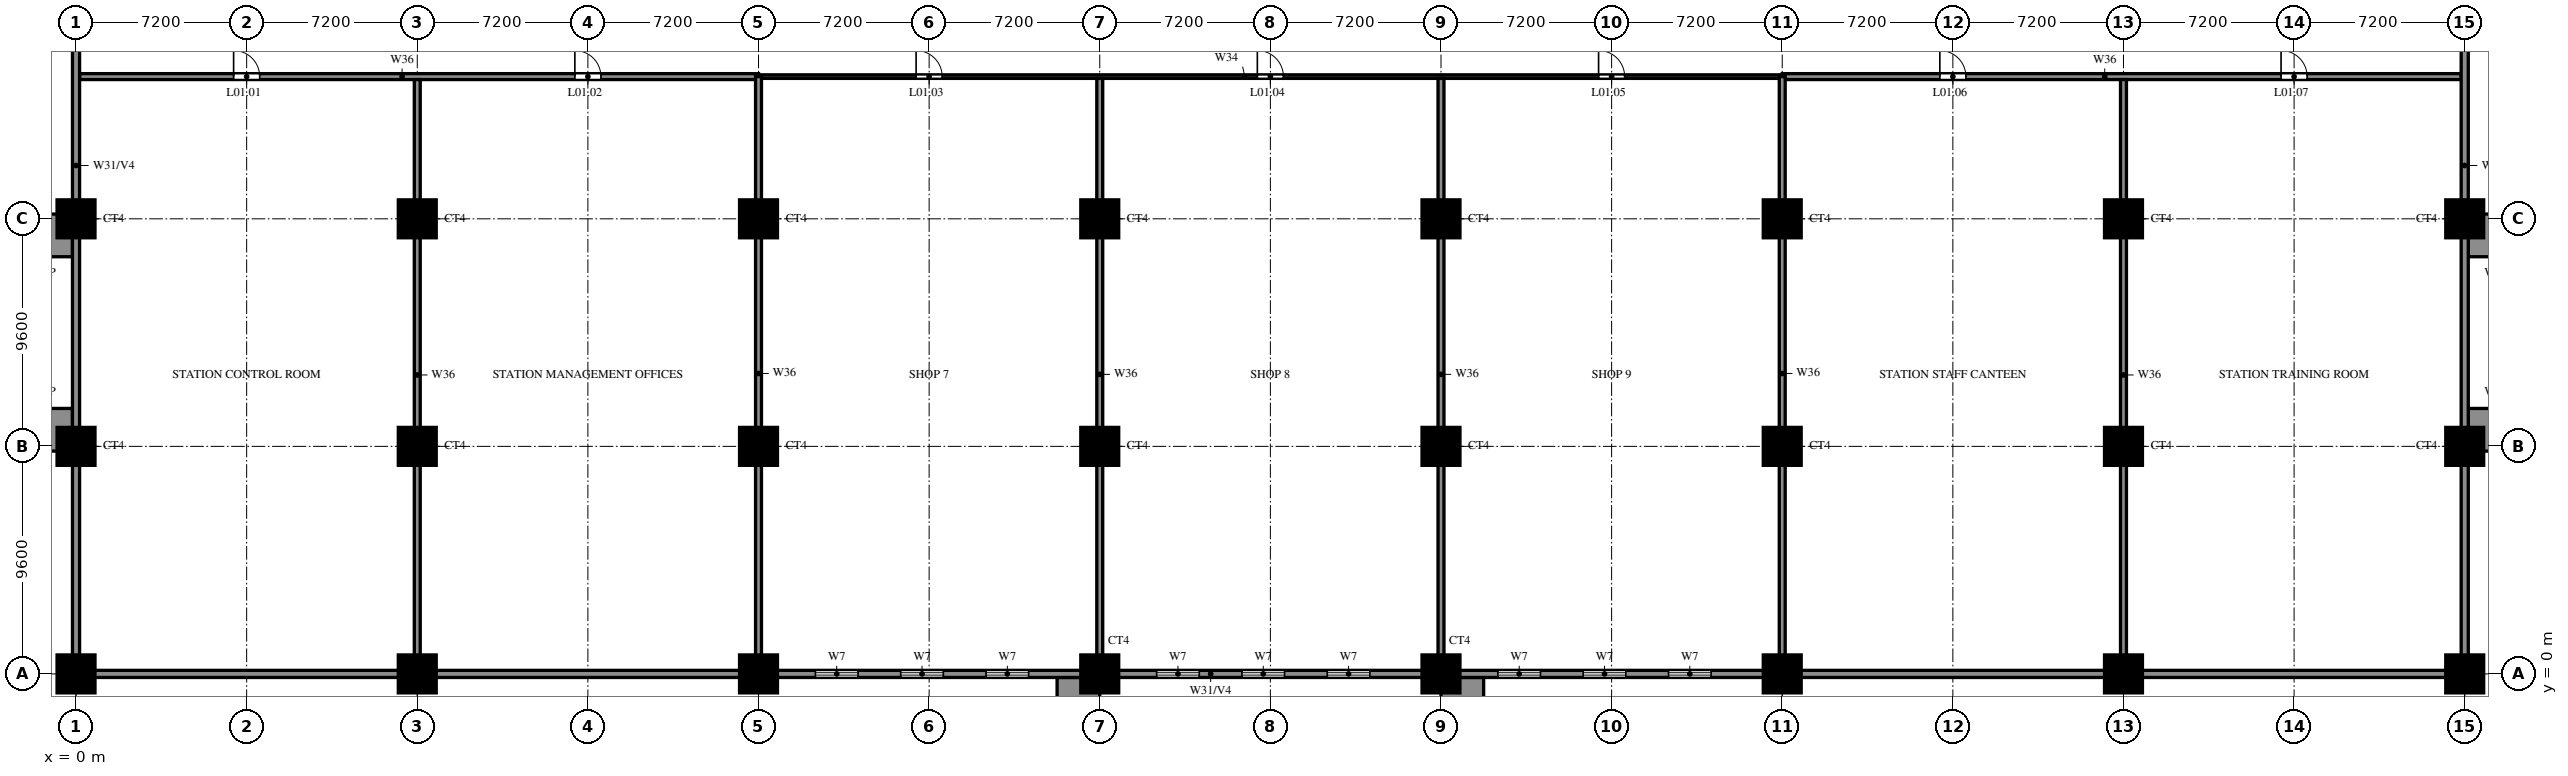
"""IFC4 building model, lengths in metres.
Left out: names, types, materials, properties, quantities, classifications, styles, units other than length and angle.
Written with IfcOpenShell. Run it as: python <this file> out.ifc"""

import sys

from ifc_helpers import new_model, si_unit, direction, frame, frame_2d, origin, origin_with_axes, origin_2d, place, context, subcontext, project, spatial, rectangle, circle, extrude, source, transform, mapped, element, fill, save


model = new_model("IFC4")
c1 = context("Model", 3, precision=1e-05, world=origin(), true_north=direction((0.0, 1.0)))
c2 = subcontext(c1, "Body", "Model", "MODEL_VIEW")
j1 = project(units=[si_unit("LENGTHUNIT", "METRE"), si_unit("PLANEANGLEUNIT", "RADIAN")], contexts=[c1])
p1 = place(None, origin())
s1 = spatial("IfcSite", under=j1, at=p1, CompositionType="ELEMENT")
p2 = place(p1, origin())
s2 = spatial("IfcBuilding", under=s1, at=p2, CompositionType="ELEMENT")
p3 = place(p2, frame((0.0, 0.0, 7.8)))
s3 = spatial("IfcBuildingStorey", under=s2, at=p3, CompositionType="ELEMENT", Elevation=7.8)
m1 = source(origin(), c2, "Body", "SweptSolid", [
    extrude(circle(Radius=0.8, at=origin_2d()), origin(), (0.0, 0.0, 1.0), 5.0),
])
for number, where, z_axis, x_axis in (
    (1, (0.0, 0.0, 0.0), (0.0, 0.0, 1.0), (1.0, 0.0, 0.0)),
    (2, (14.4, 0.0, 0.0), (0.0, 0.0, 1.0), (1.0, 0.0, 0.0)),
    (3, (28.8, 0.0, 0.0), (0.0, 0.0, 1.0), (1.0, 0.0, 0.0)),
    (4, (43.2, 0.0, 0.0), (0.0, 0.0, 1.0), (1.0, 0.0, 0.0)),
    (5, (57.6, 0.0, 0.0), (0.0, 0.0, 1.0), (1.0, 0.0, 0.0)),
    (6, (72.0, 0.0, 0.0), (0.0, 0.0, 1.0), (1.0, 0.0, 0.0)),
    (7, (86.4, 0.0, 0.0), (0.0, 0.0, 1.0), (1.0, 0.0, 0.0)),
    (8, (100.8, 0.0, 0.0), (0.0, 0.0, 1.0), (1.0, 0.0, 0.0)),
    (9, (0.0, 9.6, 0.0), (0.0, 0.0, 1.0), (1.0, 0.0, 0.0)),
    (10, (14.4, 9.6, 0.0), (0.0, 0.0, 1.0), (1.0, 0.0, 0.0)),
    (11, (28.8, 9.6, 0.0), (0.0, 0.0, 1.0), (1.0, 0.0, 0.0)),
    (12, (43.2, 9.6, 0.0), (0.0, 0.0, 1.0), (1.0, 0.0, 0.0)),
    (13, (57.6, 9.6, 0.0), (0.0, 0.0, 1.0), (1.0, 0.0, 0.0)),
    (14, (72.0, 9.6, 0.0), (0.0, 0.0, 1.0), (1.0, 0.0, 0.0)),
    (15, (86.4, 9.6, 0.0), (0.0, 0.0, 1.0), (1.0, 0.0, 0.0)),
    (16, (100.8, 9.6, 0.0), (0.0, 0.0, 1.0), (1.0, 0.0, 0.0)),
    (17, (0.0, 19.2, 0.0), (0.0, 0.0, 1.0), (1.0, 0.0, 0.0)),
    (18, (14.4, 19.2, 0.0), (0.0, 0.0, 1.0), (1.0, 0.0, 0.0)),
    (19, (28.8, 19.2, 0.0), (0.0, 0.0, 1.0), (1.0, 0.0, 0.0)),
    (20, (43.2, 19.2, 0.0), (0.0, 0.0, 1.0), (1.0, 0.0, 0.0)),
    (21, (57.6, 19.2, 0.0), (0.0, 0.0, 1.0), (1.0, 0.0, 0.0)),
    (22, (72.0, 19.2, 0.0), (0.0, 0.0, 1.0), (1.0, 0.0, 0.0)),
    (23, (86.4, 19.2, 0.0), (0.0, 0.0, 1.0), (1.0, 0.0, 0.0)),
    (24, (100.8, 19.2, 0.0), (0.0, 0.0, 1.0), (1.0, 0.0, 0.0)),
):
    element("IfcColumn", number, at=place(p3, frame(where, z_axis=z_axis, x_axis=x_axis)), inside=s3, PredefinedType="COLUMN", context=c2, shape_type="MappedRepresentation", body=[
        mapped(m1, transform((0.0, 0.0, 0.0))),
    ])
for number, where, z_axis, x_axis in (
    (25, (42.3, -2.55, 0.0), (0.0, 0.0, 1.0), (0.0, 1.0, 0.0)),
    (26, (58.5, -2.55, 0.0), (0.0, 0.0, 1.0), (0.0, 1.0, 0.0)),
    (27, (-2.55, 10.3, 0.0), (0.0, 0.0, 1.0), (1.0, 0.0, 0.0)),
    (28, (-2.55, 18.5, 0.0), (0.0, 0.0, 1.0), (1.0, 0.0, 0.0)),
    (29, (100.95, 10.3, 0.0), (0.0, 0.0, 1.0), (1.0, 0.0, 0.0)),
    (30, (100.95, 18.5, 0.0), (0.0, 0.0, 1.0), (1.0, 0.0, 0.0)),
):
    element("IfcWall", number, at=place(p3, frame(where, z_axis=z_axis, x_axis=x_axis)), inside=s3, PredefinedType="SOLIDWALL", context=c2, shape_type="SweptSolid", body=[
        extrude(rectangle(XDim=2.4, YDim=1.8, at=frame_2d((1.2, 0.0))), origin(), (0.0, 0.0, 1.0), 5.4),
    ])
p4 = place(p3, origin_with_axes())
e31 = element("IfcWall", 31, at=p4, inside=s3, PredefinedType="SOLIDWALL", context=c2, shape_type="SweptSolid", body=[
    extrude(rectangle(XDim=100.8, YDim=0.3, at=frame_2d((50.4, 0.0))), origin(), (0.0, 0.0, 1.0), 5.0),
])
p5 = place(p4, frame((31.2, 0.0, 0.6)))
e32 = element("IfcOpeningElement", 32, at=p5, cuts=e31, PredefinedType="OPENING", context=c2, shape_type="SweptSolid", body=[
    extrude(rectangle(XDim=1.8, YDim=2.4, at=frame_2d((0.9, 1.2))), frame((0.0, 0.16, 0.0), z_axis=(0.0, -1.0, 0.0), x_axis=(1.0, 0.0, 0.0)), (0.0, 0.0, 1.0), 0.32),
])
p6 = place(p4, frame((34.8, 0.0, 0.6)))
e33 = element("IfcOpeningElement", 33, at=p6, cuts=e31, PredefinedType="OPENING", context=c2, shape_type="SweptSolid", body=[
    extrude(rectangle(XDim=1.8, YDim=2.4, at=frame_2d((0.9, 1.2))), frame((0.0, 0.16, 0.0), z_axis=(0.0, -1.0, 0.0), x_axis=(1.0, 0.0, 0.0)), (0.0, 0.0, 1.0), 0.32),
])
p7 = place(p4, frame((38.4, 0.0, 0.6)))
e34 = element("IfcOpeningElement", 34, at=p7, cuts=e31, PredefinedType="OPENING", context=c2, shape_type="SweptSolid", body=[
    extrude(rectangle(XDim=1.8, YDim=2.4, at=frame_2d((0.9, 1.2))), frame((0.0, 0.16, 0.0), z_axis=(0.0, -1.0, 0.0), x_axis=(1.0, 0.0, 0.0)), (0.0, 0.0, 1.0), 0.32),
])
p8 = place(p4, frame((45.6, 0.0, 0.6)))
e35 = element("IfcOpeningElement", 35, at=p8, cuts=e31, PredefinedType="OPENING", context=c2, shape_type="SweptSolid", body=[
    extrude(rectangle(XDim=1.8, YDim=2.4, at=frame_2d((0.9, 1.2))), frame((0.0, 0.16, 0.0), z_axis=(0.0, -1.0, 0.0), x_axis=(1.0, 0.0, 0.0)), (0.0, 0.0, 1.0), 0.32),
])
p9 = place(p4, frame((49.2, 0.0, 0.6)))
e36 = element("IfcOpeningElement", 36, at=p9, cuts=e31, PredefinedType="OPENING", context=c2, shape_type="SweptSolid", body=[
    extrude(rectangle(XDim=1.8, YDim=2.4, at=frame_2d((0.9, 1.2))), frame((0.0, 0.16, 0.0), z_axis=(0.0, -1.0, 0.0), x_axis=(1.0, 0.0, 0.0)), (0.0, 0.0, 1.0), 0.32),
])
p10 = place(p4, frame((52.8, 0.0, 0.6)))
e37 = element("IfcOpeningElement", 37, at=p10, cuts=e31, PredefinedType="OPENING", context=c2, shape_type="SweptSolid", body=[
    extrude(rectangle(XDim=1.8, YDim=2.4, at=frame_2d((0.9, 1.2))), frame((0.0, 0.16, 0.0), z_axis=(0.0, -1.0, 0.0), x_axis=(1.0, 0.0, 0.0)), (0.0, 0.0, 1.0), 0.32),
])
p11 = place(p4, frame((60.0, 0.0, 0.6)))
e38 = element("IfcOpeningElement", 38, at=p11, cuts=e31, PredefinedType="OPENING", context=c2, shape_type="SweptSolid", body=[
    extrude(rectangle(XDim=1.8, YDim=2.4, at=frame_2d((0.9, 1.2))), frame((0.0, 0.16, 0.0), z_axis=(0.0, -1.0, 0.0), x_axis=(1.0, 0.0, 0.0)), (0.0, 0.0, 1.0), 0.32),
])
p12 = place(p4, frame((63.6, 0.0, 0.6)))
e39 = element("IfcOpeningElement", 39, at=p12, cuts=e31, PredefinedType="OPENING", context=c2, shape_type="SweptSolid", body=[
    extrude(rectangle(XDim=1.8, YDim=2.4, at=frame_2d((0.9, 1.2))), frame((0.0, 0.16, 0.0), z_axis=(0.0, -1.0, 0.0), x_axis=(1.0, 0.0, 0.0)), (0.0, 0.0, 1.0), 0.32),
])
p13 = place(p4, frame((67.2, 0.0, 0.6)))
e40 = element("IfcOpeningElement", 40, at=p13, cuts=e31, PredefinedType="OPENING", context=c2, shape_type="SweptSolid", body=[
    extrude(rectangle(XDim=1.8, YDim=2.4, at=frame_2d((0.9, 1.2))), frame((0.0, 0.16, 0.0), z_axis=(0.0, -1.0, 0.0), x_axis=(1.0, 0.0, 0.0)), (0.0, 0.0, 1.0), 0.32),
])
p14 = place(p3, frame((28.8, 25.2, 0.0), z_axis=(0.0, 0.0, 1.0), x_axis=(1.0, 0.0, 0.0)))
e41 = element("IfcWall", 41, at=p14, inside=s3, PredefinedType="PARTITIONING", context=c2, shape_type="SweptSolid", body=[
    extrude(rectangle(XDim=43.2, YDim=0.15, at=frame_2d((21.6, 0.0))), origin(), (0.0, 0.0, 1.0), 3.8),
])
p15 = place(p14, frame((6.65, 0.0, 0.0)))
e42 = element("IfcOpeningElement", 42, at=p15, cuts=e41, PredefinedType="OPENING", context=c2, shape_type="SweptSolid", body=[
    extrude(rectangle(XDim=1.1, YDim=2.1, at=frame_2d((0.55, 1.05))), frame((0.0, 0.085, 0.0), z_axis=(0.0, -1.0, 0.0), x_axis=(1.0, 0.0, 0.0)), (0.0, 0.0, 1.0), 0.17),
])
p16 = place(p14, frame((21.05, 0.0, 0.0)))
e43 = element("IfcOpeningElement", 43, at=p16, cuts=e41, PredefinedType="OPENING", context=c2, shape_type="SweptSolid", body=[
    extrude(rectangle(XDim=1.1, YDim=2.1, at=frame_2d((0.55, 1.05))), frame((0.0, 0.085, 0.0), z_axis=(0.0, -1.0, 0.0), x_axis=(1.0, 0.0, 0.0)), (0.0, 0.0, 1.0), 0.17),
])
p17 = place(p14, frame((35.45, 0.0, 0.0)))
e44 = element("IfcOpeningElement", 44, at=p17, cuts=e41, PredefinedType="OPENING", context=c2, shape_type="SweptSolid", body=[
    extrude(rectangle(XDim=1.1, YDim=2.1, at=frame_2d((0.55, 1.05))), frame((0.0, 0.085, 0.0), z_axis=(0.0, -1.0, 0.0), x_axis=(1.0, 0.0, 0.0)), (0.0, 0.0, 1.0), 0.17),
])
p18 = place(p3, frame((0.15, 25.2, 0.0), z_axis=(0.0, 0.0, 1.0), x_axis=(1.0, 0.0, 0.0)))
e45 = element("IfcWall", 45, at=p18, inside=s3, PredefinedType="SOLIDWALL", context=c2, shape_type="SweptSolid", body=[
    extrude(rectangle(XDim=28.65, YDim=0.25, at=frame_2d((14.325, 0.0))), origin(), (0.0, 0.0, 1.0), 3.8),
])
p19 = place(p18, frame((6.5, 0.0, 0.0)))
e46 = element("IfcOpeningElement", 46, at=p19, cuts=e45, PredefinedType="OPENING", context=c2, shape_type="SweptSolid", body=[
    extrude(rectangle(XDim=1.1, YDim=2.1, at=frame_2d((0.55, 1.05))), frame((0.0, 0.135, 0.0), z_axis=(0.0, -1.0, 0.0), x_axis=(1.0, 0.0, 0.0)), (0.0, 0.0, 1.0), 0.27),
])
p20 = place(p18, frame((20.9, 0.0, 0.0)))
e47 = element("IfcOpeningElement", 47, at=p20, cuts=e45, PredefinedType="OPENING", context=c2, shape_type="SweptSolid", body=[
    extrude(rectangle(XDim=1.1, YDim=2.1, at=frame_2d((0.55, 1.05))), frame((0.0, 0.135, 0.0), z_axis=(0.0, -1.0, 0.0), x_axis=(1.0, 0.0, 0.0)), (0.0, 0.0, 1.0), 0.27),
])
p21 = place(p3, frame((72.0, 25.2, 0.0), z_axis=(0.0, 0.0, 1.0), x_axis=(1.0, 0.0, 0.0)))
e48 = element("IfcWall", 48, at=p21, inside=s3, PredefinedType="SOLIDWALL", context=c2, shape_type="SweptSolid", body=[
    extrude(rectangle(XDim=28.65, YDim=0.25, at=frame_2d((14.325, 0.0))), origin(), (0.0, 0.0, 1.0), 3.8),
])
p22 = place(p21, frame((6.65, 0.0, 0.0)))
e49 = element("IfcOpeningElement", 49, at=p22, cuts=e48, PredefinedType="OPENING", context=c2, shape_type="SweptSolid", body=[
    extrude(rectangle(XDim=1.1, YDim=2.1, at=frame_2d((0.55, 1.05))), frame((0.0, 0.135, 0.0), z_axis=(0.0, -1.0, 0.0), x_axis=(1.0, 0.0, 0.0)), (0.0, 0.0, 1.0), 0.27),
])
p23 = place(p21, frame((21.05, 0.0, 0.0)))
e50 = element("IfcOpeningElement", 50, at=p23, cuts=e48, PredefinedType="OPENING", context=c2, shape_type="SweptSolid", body=[
    extrude(rectangle(XDim=1.1, YDim=2.1, at=frame_2d((0.55, 1.05))), frame((0.0, 0.135, 0.0), z_axis=(0.0, -1.0, 0.0), x_axis=(1.0, 0.0, 0.0)), (0.0, 0.0, 1.0), 0.27),
])
p24 = place(p3, frame((0.0, 0.0, 0.0), z_axis=(0.0, 0.0, 1.0), x_axis=(0.0, 1.0, 0.0)))
e51 = element("IfcWall", 51, at=p24, inside=s3, PredefinedType="SOLIDWALL", context=c2, shape_type="SweptSolid", body=[
    extrude(rectangle(XDim=42.9, YDim=0.3, at=frame_2d((21.45, 0.0))), origin(), (0.0, 0.0, 1.0), 5.0),
])
p25 = place(p24, frame((34.65, 0.0, 0.6)))
e52 = element("IfcOpeningElement", 52, at=p25, cuts=e51, PredefinedType="OPENING", context=c2, shape_type="SweptSolid", body=[
    extrude(rectangle(XDim=1.8, YDim=2.4, at=frame_2d((0.9, 1.2))), frame((0.0, 0.16, 0.0), z_axis=(0.0, -1.0, 0.0), x_axis=(1.0, 0.0, 0.0)), (0.0, 0.0, 1.0), 0.32),
])
p26 = place(p24, frame((38.25, 0.0, 0.6)))
e53 = element("IfcOpeningElement", 53, at=p26, cuts=e51, PredefinedType="OPENING", context=c2, shape_type="SweptSolid", body=[
    extrude(rectangle(XDim=1.8, YDim=2.4, at=frame_2d((0.9, 1.2))), frame((0.0, 0.16, 0.0), z_axis=(0.0, -1.0, 0.0), x_axis=(1.0, 0.0, 0.0)), (0.0, 0.0, 1.0), 0.32),
])
p27 = place(p3, frame((14.4, 0.15, 0.0), z_axis=(0.0, 0.0, 1.0), x_axis=(0.0, 1.0, 0.0)))
e54 = element("IfcWall", 54, at=p27, inside=s3, PredefinedType="SOLIDWALL", context=c2, shape_type="SweptSolid", body=[
    extrude(rectangle(XDim=24.925, YDim=0.25, at=frame_2d((12.462, 0.0))), origin(), (0.0, 0.0, 1.0), 3.8),
])
p28 = place(p3, frame((28.8, 0.15, 0.0), z_axis=(0.0, 0.0, 1.0), x_axis=(0.0, 1.0, 0.0)))
e55 = element("IfcWall", 55, at=p28, inside=s3, PredefinedType="SOLIDWALL", context=c2, shape_type="SweptSolid", body=[
    extrude(rectangle(XDim=25.05, YDim=0.25, at=frame_2d((12.525, 0.0))), origin(), (0.0, 0.0, 1.0), 3.8),
])
for number, where, z_axis, x_axis in (
    (56, (43.2, 0.15, 0.0), (0.0, 0.0, 1.0), (0.0, 1.0, 0.0)),
    (57, (57.6, 0.15, 0.0), (0.0, 0.0, 1.0), (0.0, 1.0, 0.0)),
):
    element("IfcWall", number, at=place(p3, frame(where, z_axis=z_axis, x_axis=x_axis)), inside=s3, PredefinedType="SOLIDWALL", context=c2, shape_type="SweptSolid", body=[
        extrude(rectangle(XDim=24.975, YDim=0.25, at=frame_2d((12.488, 0.0))), origin(), (0.0, 0.0, 1.0), 3.8),
    ])
p29 = place(p3, frame((72.0, 0.15, 0.0), z_axis=(0.0, 0.0, 1.0), x_axis=(0.0, 1.0, 0.0)))
e58 = element("IfcWall", 58, at=p29, inside=s3, PredefinedType="SOLIDWALL", context=c2, shape_type="SweptSolid", body=[
    extrude(rectangle(XDim=25.05, YDim=0.25, at=frame_2d((12.525, 0.0))), origin(), (0.0, 0.0, 1.0), 3.8),
])
p30 = place(p3, frame((86.4, 0.15, 0.0), z_axis=(0.0, 0.0, 1.0), x_axis=(0.0, 1.0, 0.0)))
e59 = element("IfcWall", 59, at=p30, inside=s3, PredefinedType="SOLIDWALL", context=c2, shape_type="SweptSolid", body=[
    extrude(rectangle(XDim=24.925, YDim=0.25, at=frame_2d((12.462, 0.0))), origin(), (0.0, 0.0, 1.0), 3.8),
])
p31 = place(p3, frame((100.8, 0.0, 0.0), z_axis=(0.0, 0.0, 1.0), x_axis=(0.0, 1.0, 0.0)))
e60 = element("IfcWall", 60, at=p31, inside=s3, PredefinedType="SOLIDWALL", context=c2, shape_type="SweptSolid", body=[
    extrude(rectangle(XDim=42.9, YDim=0.3, at=frame_2d((21.45, 0.0))), origin(), (0.0, 0.0, 1.0), 5.0),
])
p32 = place(p19, origin())
e61 = element("IfcDoor", 61, at=p32, inside=s3, OperationType="SINGLE_SWING_LEFT", PredefinedType="DOOR", context=c2, shape_type="SweptSolid", body=[
    extrude(rectangle(XDim=1.1, YDim=2.1, at=frame_2d((0.55, 1.05))), frame((0.0, 0.025, 0.0), z_axis=(0.0, -1.0, 0.0), x_axis=(1.0, 0.0, 0.0)), (0.0, 0.0, 1.0), 0.05),
])
fill(e46, e61)
p33 = place(p20, origin())
e62 = element("IfcDoor", 62, at=p33, inside=s3, OperationType="SINGLE_SWING_RIGHT", PredefinedType="DOOR", context=c2, shape_type="SweptSolid", body=[
    extrude(rectangle(XDim=1.1, YDim=2.1, at=frame_2d((0.55, 1.05))), frame((0.0, 0.025, 0.0), z_axis=(0.0, -1.0, 0.0), x_axis=(1.0, 0.0, 0.0)), (0.0, 0.0, 1.0), 0.05),
])
fill(e47, e62)
p34 = place(p15, origin())
e63 = element("IfcDoor", 63, at=p34, inside=s3, OperationType="SINGLE_SWING_LEFT", PredefinedType="DOOR", context=c2, shape_type="SweptSolid", body=[
    extrude(rectangle(XDim=1.1, YDim=2.1, at=frame_2d((0.55, 1.05))), frame((0.0, 0.025, 0.0), z_axis=(0.0, -1.0, 0.0), x_axis=(1.0, 0.0, 0.0)), (0.0, 0.0, 1.0), 0.05),
])
fill(e42, e63)
p35 = place(p16, origin())
e64 = element("IfcDoor", 64, at=p35, inside=s3, OperationType="SINGLE_SWING_RIGHT", PredefinedType="DOOR", context=c2, shape_type="SweptSolid", body=[
    extrude(rectangle(XDim=1.1, YDim=2.1, at=frame_2d((0.55, 1.05))), frame((0.0, 0.025, 0.0), z_axis=(0.0, -1.0, 0.0), x_axis=(1.0, 0.0, 0.0)), (0.0, 0.0, 1.0), 0.05),
])
fill(e43, e64)
p36 = place(p17, origin())
e65 = element("IfcDoor", 65, at=p36, inside=s3, OperationType="SINGLE_SWING_RIGHT", PredefinedType="DOOR", context=c2, shape_type="SweptSolid", body=[
    extrude(rectangle(XDim=1.1, YDim=2.1, at=frame_2d((0.55, 1.05))), frame((0.0, 0.025, 0.0), z_axis=(0.0, -1.0, 0.0), x_axis=(1.0, 0.0, 0.0)), (0.0, 0.0, 1.0), 0.05),
])
fill(e44, e65)
p37 = place(p22, origin())
e66 = element("IfcDoor", 66, at=p37, inside=s3, OperationType="SINGLE_SWING_LEFT", PredefinedType="DOOR", context=c2, shape_type="SweptSolid", body=[
    extrude(rectangle(XDim=1.1, YDim=2.1, at=frame_2d((0.55, 1.05))), frame((0.0, 0.025, 0.0), z_axis=(0.0, -1.0, 0.0), x_axis=(1.0, 0.0, 0.0)), (0.0, 0.0, 1.0), 0.05),
])
fill(e49, e66)
p38 = place(p23, origin())
e67 = element("IfcDoor", 67, at=p38, inside=s3, OperationType="SINGLE_SWING_RIGHT", PredefinedType="DOOR", context=c2, shape_type="SweptSolid", body=[
    extrude(rectangle(XDim=1.1, YDim=2.1, at=frame_2d((0.55, 1.05))), frame((0.0, 0.025, 0.0), z_axis=(0.0, -1.0, 0.0), x_axis=(1.0, 0.0, 0.0)), (0.0, 0.0, 1.0), 0.05),
])
fill(e50, e67)
p39 = place(p5, origin())
e68 = element("IfcWindow", 68, at=p39, inside=s3, PartitioningType="DOUBLE_PANEL_VERTICAL", PredefinedType="WINDOW", context=c2, shape_type="SweptSolid", body=[
    extrude(rectangle(XDim=1.8, YDim=2.4, at=frame_2d((0.9, 1.2))), frame((0.0, 0.03, 0.0), z_axis=(0.0, -1.0, 0.0), x_axis=(1.0, 0.0, 0.0)), (0.0, 0.0, 1.0), 0.06),
])
fill(e32, e68)
p40 = place(p6, origin())
e69 = element("IfcWindow", 69, at=p40, inside=s3, PartitioningType="DOUBLE_PANEL_VERTICAL", PredefinedType="WINDOW", context=c2, shape_type="SweptSolid", body=[
    extrude(rectangle(XDim=1.8, YDim=2.4, at=frame_2d((0.9, 1.2))), frame((0.0, 0.03, 0.0), z_axis=(0.0, -1.0, 0.0), x_axis=(1.0, 0.0, 0.0)), (0.0, 0.0, 1.0), 0.06),
])
fill(e33, e69)
p41 = place(p7, origin())
e70 = element("IfcWindow", 70, at=p41, inside=s3, PartitioningType="DOUBLE_PANEL_VERTICAL", PredefinedType="WINDOW", context=c2, shape_type="SweptSolid", body=[
    extrude(rectangle(XDim=1.8, YDim=2.4, at=frame_2d((0.9, 1.2))), frame((0.0, 0.03, 0.0), z_axis=(0.0, -1.0, 0.0), x_axis=(1.0, 0.0, 0.0)), (0.0, 0.0, 1.0), 0.06),
])
fill(e34, e70)
p42 = place(p8, origin())
e71 = element("IfcWindow", 71, at=p42, inside=s3, PartitioningType="DOUBLE_PANEL_VERTICAL", PredefinedType="WINDOW", context=c2, shape_type="SweptSolid", body=[
    extrude(rectangle(XDim=1.8, YDim=2.4, at=frame_2d((0.9, 1.2))), frame((0.0, 0.03, 0.0), z_axis=(0.0, -1.0, 0.0), x_axis=(1.0, 0.0, 0.0)), (0.0, 0.0, 1.0), 0.06),
])
fill(e35, e71)
p43 = place(p9, origin())
e72 = element("IfcWindow", 72, at=p43, inside=s3, PartitioningType="DOUBLE_PANEL_VERTICAL", PredefinedType="WINDOW", context=c2, shape_type="SweptSolid", body=[
    extrude(rectangle(XDim=1.8, YDim=2.4, at=frame_2d((0.9, 1.2))), frame((0.0, 0.03, 0.0), z_axis=(0.0, -1.0, 0.0), x_axis=(1.0, 0.0, 0.0)), (0.0, 0.0, 1.0), 0.06),
])
fill(e36, e72)
p44 = place(p10, origin())
e73 = element("IfcWindow", 73, at=p44, inside=s3, PartitioningType="DOUBLE_PANEL_VERTICAL", PredefinedType="WINDOW", context=c2, shape_type="SweptSolid", body=[
    extrude(rectangle(XDim=1.8, YDim=2.4, at=frame_2d((0.9, 1.2))), frame((0.0, 0.03, 0.0), z_axis=(0.0, -1.0, 0.0), x_axis=(1.0, 0.0, 0.0)), (0.0, 0.0, 1.0), 0.06),
])
fill(e37, e73)
p45 = place(p11, origin())
e74 = element("IfcWindow", 74, at=p45, inside=s3, PartitioningType="DOUBLE_PANEL_VERTICAL", PredefinedType="WINDOW", context=c2, shape_type="SweptSolid", body=[
    extrude(rectangle(XDim=1.8, YDim=2.4, at=frame_2d((0.9, 1.2))), frame((0.0, 0.03, 0.0), z_axis=(0.0, -1.0, 0.0), x_axis=(1.0, 0.0, 0.0)), (0.0, 0.0, 1.0), 0.06),
])
fill(e38, e74)
p46 = place(p12, origin())
e75 = element("IfcWindow", 75, at=p46, inside=s3, PartitioningType="DOUBLE_PANEL_VERTICAL", PredefinedType="WINDOW", context=c2, shape_type="SweptSolid", body=[
    extrude(rectangle(XDim=1.8, YDim=2.4, at=frame_2d((0.9, 1.2))), frame((0.0, 0.03, 0.0), z_axis=(0.0, -1.0, 0.0), x_axis=(1.0, 0.0, 0.0)), (0.0, 0.0, 1.0), 0.06),
])
fill(e39, e75)
p47 = place(p13, origin())
e76 = element("IfcWindow", 76, at=p47, inside=s3, PartitioningType="DOUBLE_PANEL_VERTICAL", PredefinedType="WINDOW", context=c2, shape_type="SweptSolid", body=[
    extrude(rectangle(XDim=1.8, YDim=2.4, at=frame_2d((0.9, 1.2))), frame((0.0, 0.03, 0.0), z_axis=(0.0, -1.0, 0.0), x_axis=(1.0, 0.0, 0.0)), (0.0, 0.0, 1.0), 0.06),
])
fill(e40, e76)
save(model, sys.argv[1])
